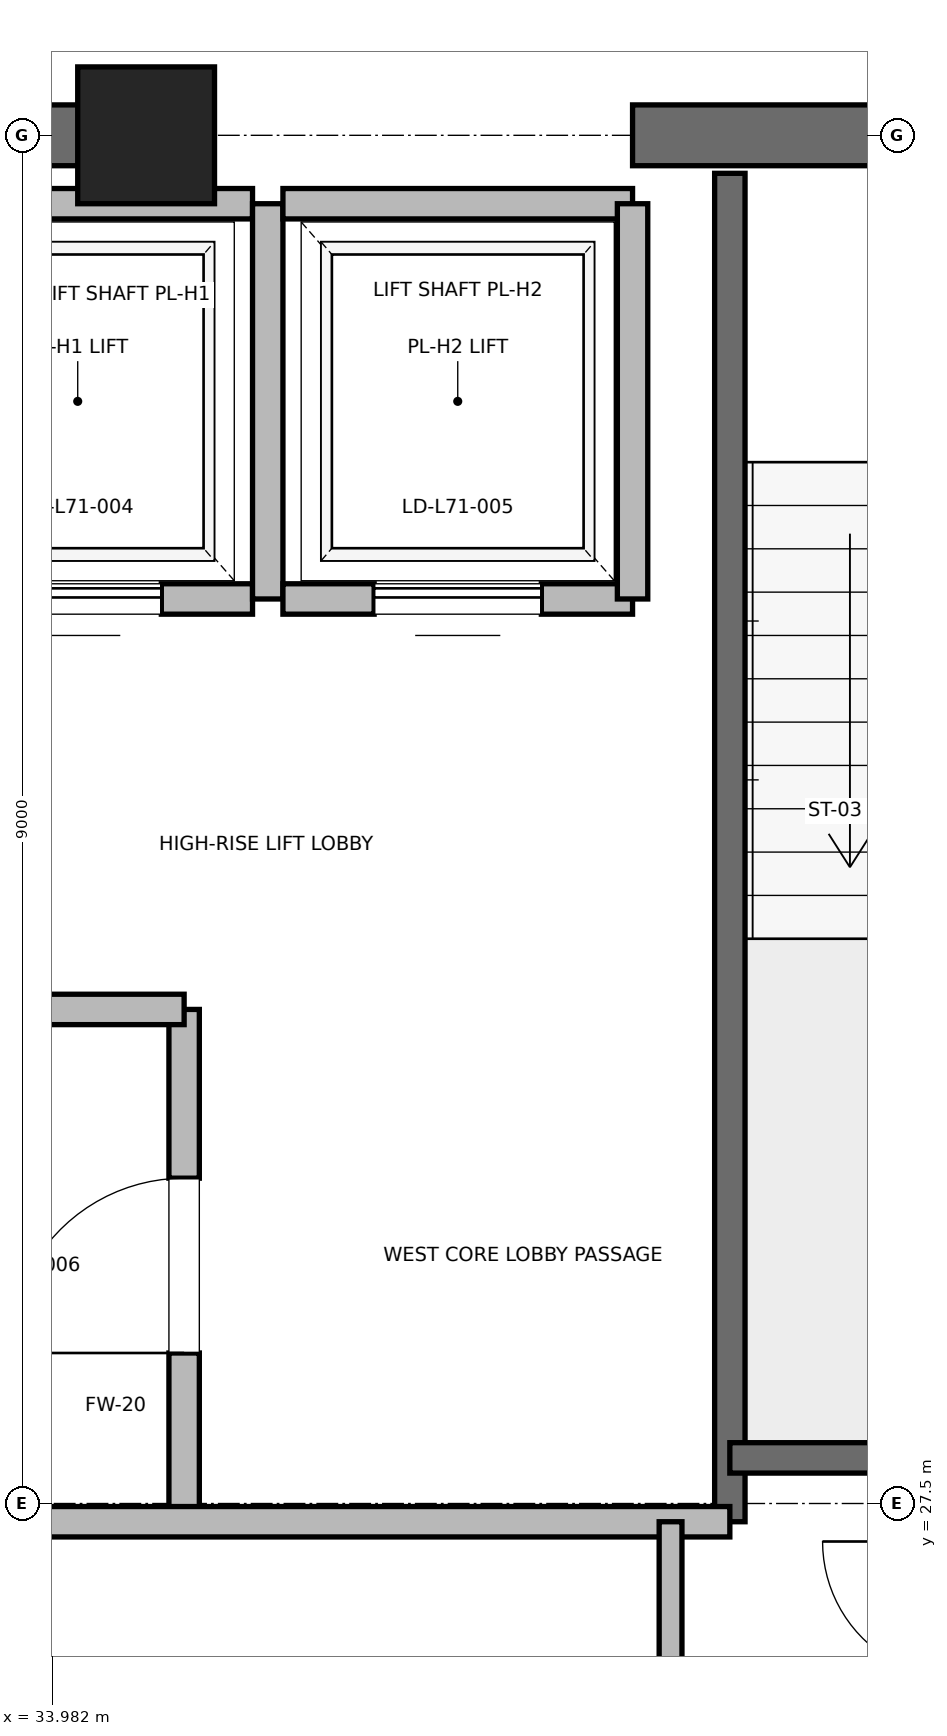
"""IFC4 building model, lengths in metres.
Left out: names, types, materials, properties, quantities, classifications, styles, units other than length and angle.
Written with IfcOpenShell. Run it as: python <this file> out.ifc"""

import sys

from ifc_helpers import new_model, si_unit, direction, frame, frame_2d, origin, origin_2d, place, context, subcontext, project, spatial, rectangle, extrude, element, fill, save


model = new_model("IFC4")
c1 = context("Model", 3, precision=1e-05, world=origin(), true_north=direction((0.0, 1.0)))
c2 = subcontext(c1, "Body", "Model", "MODEL_VIEW")
j1 = project(units=[si_unit("LENGTHUNIT", "METRE"), si_unit("PLANEANGLEUNIT", "RADIAN")], contexts=[c1])
p1 = place(None, origin())
s1 = spatial("IfcSite", under=j1, at=p1, CompositionType="ELEMENT")
p2 = place(p1, origin())
s2 = spatial("IfcBuilding", under=s1, at=p2, CompositionType="ELEMENT")
p3 = place(p2, frame((0.0, 0.0, 306.8)))
s3 = spatial("IfcBuildingStorey", under=s2, at=p3, CompositionType="ELEMENT", Elevation=306.8)
p4 = place(p3, frame((34.6, 36.5, 0.0), z_axis=(0.0, 0.0, 1.0), x_axis=(1.0, 0.0, 0.0)))
e1 = element("IfcColumn", 1, at=p4, inside=s3, PredefinedType="PILASTER", context=c2, shape_type="SweptSolid", body=[
    extrude(rectangle(XDim=0.9, YDim=0.9, at=origin_2d()), origin(), (0.0, 0.0, 1.0), 4.0),
])
p5 = place(p3, frame((29.0, 36.5, 0.0), z_axis=(0.0, 0.0, 1.0), x_axis=(1.0, 0.0, 0.0)))
e2 = element("IfcWall", 2, at=p5, inside=s3, PredefinedType="SHEAR", context=c2, shape_type="SweptSolid", body=[
    extrude(rectangle(XDim=5.8, YDim=0.4, at=frame_2d((2.9, 0.0))), origin(), (0.0, 0.0, 1.0), 3.785),
])
p6 = place(p3, frame((37.8, 36.5, 0.0), z_axis=(0.0, 0.0, 1.0), x_axis=(1.0, 0.0, 0.0)))
e3 = element("IfcWall", 3, at=p6, inside=s3, PredefinedType="SHEAR", context=c2, shape_type="SweptSolid", body=[
    extrude(rectangle(XDim=4.4, YDim=0.4, at=frame_2d((2.2, 0.0))), origin(), (0.0, 0.0, 1.0), 3.785),
])
p7 = place(p6, frame((1.65, 0.0, 0.0)))
e4 = element("IfcOpeningElement", 4, at=p7, cuts=e3, PredefinedType="OPENING", context=c2, shape_type="SweptSolid", body=[
    extrude(rectangle(XDim=1.1, YDim=2.15, at=frame_2d((0.55, 1.075))), frame((0.0, 0.2, 0.0), z_axis=(0.0, -1.0, 0.0), x_axis=(1.0, 0.0, 0.0)), (0.0, 0.0, 1.0), 0.4),
])
p8 = place(p3, frame((38.44, 27.38, 0.0), z_axis=(0.0, 0.0, 1.0), x_axis=(0.0, 1.0, 0.0)))
e5 = element("IfcWall", 5, at=p8, inside=s3, PredefinedType="SOLIDWALL", context=c2, shape_type="SweptSolid", body=[
    extrude(rectangle(XDim=8.87, YDim=0.2, at=frame_2d((4.435, 0.0))), origin(), (0.0, 0.0, 1.0), 3.785),
])
p9 = place(p3, frame((38.44, 27.8, 0.0), z_axis=(0.0, 0.0, 1.0), x_axis=(1.0, 0.0, 0.0)))
e6 = element("IfcWall", 6, at=p9, inside=s3, PredefinedType="SOLIDWALL", context=c2, shape_type="SweptSolid", body=[
    extrude(rectangle(XDim=3.32, YDim=0.2, at=frame_2d((1.66, 0.0))), origin(), (0.0, 0.0, 1.0), 3.785),
])
p10 = place(p3, frame((34.85, 27.38, 0.0), z_axis=(0.0, 0.0, 1.0), x_axis=(0.0, 1.0, 0.0)))
e7 = element("IfcWall", 7, at=p10, inside=s3, PredefinedType="PARTITIONING", context=c2, shape_type="SweptSolid", body=[
    extrude(rectangle(XDim=3.37, YDim=0.2, at=frame_2d((1.685, 0.0))), origin(), (0.0, 0.0, 1.0), 3.785),
])
p11 = place(p10, frame((1.11, 0.0, 0.0)))
e8 = element("IfcOpeningElement", 8, at=p11, cuts=e7, PredefinedType="OPENING", context=c2, shape_type="SweptSolid", body=[
    extrude(rectangle(XDim=1.15, YDim=2.2, at=frame_2d((0.575, 1.1))), frame((0.0, 0.1, 0.0), z_axis=(0.0, -1.0, 0.0), x_axis=(1.0, 0.0, 0.0)), (0.0, 0.0, 1.0), 0.2),
])
p12 = place(p3, frame((32.82, 27.38, 0.0), z_axis=(0.0, 0.0, 1.0), x_axis=(1.0, 0.0, 0.0)))
e9 = element("IfcWall", 9, at=p12, inside=s3, PredefinedType="PARTITIONING", context=c2, shape_type="SweptSolid", body=[
    extrude(rectangle(XDim=5.62, YDim=0.2, at=frame_2d((2.81, 0.0))), origin(), (0.0, 0.0, 1.0), 3.785),
])
p13 = place(p3, frame((32.15, 30.75, 0.0), z_axis=(0.0, 0.0, 1.0), x_axis=(1.0, 0.0, 0.0)))
e10 = element("IfcWall", 10, at=p13, inside=s3, PredefinedType="PARTITIONING", context=c2, shape_type="SweptSolid", body=[
    extrude(rectangle(XDim=2.7, YDim=0.2, at=frame_2d((1.35, 0.0))), origin(), (0.0, 0.0, 1.0), 3.785),
])
p14 = place(p3, frame((33.0, 33.45, 0.0), z_axis=(0.0, 0.0, 1.0), x_axis=(1.0, 0.0, 0.0)))
e11 = element("IfcWall", 11, at=p14, inside=s3, PredefinedType="SOLIDWALL", context=c2, shape_type="SweptSolid", body=[
    extrude(rectangle(XDim=2.3, YDim=0.2, at=frame_2d((1.15, 0.0))), origin(), (0.0, 0.0, 1.0), 3.785),
])
p15 = place(p14, frame((0.6, 0.0, 0.0)))
e12 = element("IfcOpeningElement", 12, at=p15, cuts=e11, PredefinedType="OPENING", context=c2, shape_type="SweptSolid", body=[
    extrude(rectangle(XDim=1.1, YDim=2.2, at=frame_2d((0.55, 1.1))), frame((0.0, 0.1, 0.0), z_axis=(0.0, -1.0, 0.0), x_axis=(1.0, 0.0, 0.0)), (0.0, 0.0, 1.0), 0.2),
])
p16 = place(p3, frame((35.3, 36.05, 0.0), z_axis=(0.0, 0.0, 1.0), x_axis=(-1.0, 0.0, 0.0)))
e13 = element("IfcWall", 13, at=p16, inside=s3, PredefinedType="SOLIDWALL", context=c2, shape_type="SweptSolid", body=[
    extrude(rectangle(XDim=2.3, YDim=0.2, at=frame_2d((1.15, 0.0))), origin(), (0.0, 0.0, 1.0), 2.865),
])
p17 = place(p3, frame((35.4, 33.45, 0.0), z_axis=(0.0, 0.0, 1.0), x_axis=(0.0, 1.0, 0.0)))
e14 = element("IfcWall", 14, at=p17, inside=s3, PredefinedType="SOLIDWALL", context=c2, shape_type="SweptSolid", body=[
    extrude(rectangle(XDim=2.6, YDim=0.2, at=frame_2d((1.3, 0.0))), origin(), (0.0, 0.0, 1.0), 2.865),
])
p18 = place(p3, frame((35.5, 33.45, 0.0), z_axis=(0.0, 0.0, 1.0), x_axis=(1.0, 0.0, 0.0)))
e15 = element("IfcWall", 15, at=p18, inside=s3, PredefinedType="SOLIDWALL", context=c2, shape_type="SweptSolid", body=[
    extrude(rectangle(XDim=2.3, YDim=0.2, at=frame_2d((1.15, 0.0))), origin(), (0.0, 0.0, 1.0), 3.785),
])
p19 = place(p18, frame((0.6, 0.0, 0.0)))
e16 = element("IfcOpeningElement", 16, at=p19, cuts=e15, PredefinedType="OPENING", context=c2, shape_type="SweptSolid", body=[
    extrude(rectangle(XDim=1.1, YDim=2.2, at=frame_2d((0.55, 1.1))), frame((0.0, 0.1, 0.0), z_axis=(0.0, -1.0, 0.0), x_axis=(1.0, 0.0, 0.0)), (0.0, 0.0, 1.0), 0.2),
])
p20 = place(p3, frame((37.8, 36.05, 0.0), z_axis=(0.0, 0.0, 1.0), x_axis=(-1.0, 0.0, 0.0)))
e17 = element("IfcWall", 17, at=p20, inside=s3, PredefinedType="SOLIDWALL", context=c2, shape_type="SweptSolid", body=[
    extrude(rectangle(XDim=2.3, YDim=0.2, at=frame_2d((1.15, 0.0))), origin(), (0.0, 0.0, 1.0), 2.865),
])
p21 = place(p3, frame((37.8, 33.45, 0.0), z_axis=(0.0, 0.0, 1.0), x_axis=(0.0, 1.0, 0.0)))
e18 = element("IfcWall", 18, at=p21, inside=s3, PredefinedType="SOLIDWALL", context=c2, shape_type="SweptSolid", body=[
    extrude(rectangle(XDim=2.6, YDim=0.2, at=frame_2d((1.3, 0.0))), origin(), (0.0, 0.0, 1.0), 2.865),
])
p22 = place(p3, frame((38.05, 24.5, 0.0), z_axis=(0.0, 0.0, 1.0), x_axis=(0.0, 1.0, 0.0)))
e19 = element("IfcWall", 19, at=p22, inside=s3, PredefinedType="PARTITIONING", context=c2, shape_type="SweptSolid", body=[
    extrude(rectangle(XDim=2.88, YDim=0.15, at=frame_2d((1.44, 0.0))), origin(), (0.0, 0.0, 1.0), 2.85),
])
p23 = place(p22, frame((0.94, 0.0, 0.0)))
e20 = element("IfcOpeningElement", 20, at=p23, cuts=e19, PredefinedType="OPENING", context=c2, shape_type="SweptSolid", body=[
    extrude(rectangle(XDim=1.0, YDim=2.15, at=frame_2d((0.5, 1.075))), frame((0.0, 0.075, 0.0), z_axis=(0.0, -1.0, 0.0), x_axis=(1.0, 0.0, 0.0)), (0.0, 0.0, 1.0), 0.15),
])
p24 = place(p11, origin())
e21 = element("IfcDoor", 21, at=p24, inside=s3, OperationType="SINGLE_SWING_LEFT", PredefinedType="DOOR", context=c2, shape_type="SweptSolid", body=[
    extrude(rectangle(XDim=1.15, YDim=2.2, at=frame_2d((0.575, 1.1))), frame((0.0, 0.025, 0.0), z_axis=(0.0, -1.0, 0.0), x_axis=(1.0, 0.0, 0.0)), (0.0, 0.0, 1.0), 0.05),
])
fill(e8, e21)
p25 = place(p15, origin())
e22 = element("IfcDoor", 22, at=p25, inside=s3, OperationType="SLIDING_TO_RIGHT", PredefinedType="DOOR", context=c2, shape_type="SweptSolid", body=[
    extrude(rectangle(XDim=1.1, YDim=2.2, at=frame_2d((0.55, 1.1))), frame((0.0, 0.025, 0.0), z_axis=(0.0, -1.0, 0.0), x_axis=(1.0, 0.0, 0.0)), (0.0, 0.0, 1.0), 0.05),
])
fill(e12, e22)
p26 = place(p19, origin())
e23 = element("IfcDoor", 23, at=p26, inside=s3, OperationType="SLIDING_TO_RIGHT", PredefinedType="DOOR", context=c2, shape_type="SweptSolid", body=[
    extrude(rectangle(XDim=1.1, YDim=2.2, at=frame_2d((0.55, 1.1))), frame((0.0, 0.025, 0.0), z_axis=(0.0, -1.0, 0.0), x_axis=(1.0, 0.0, 0.0)), (0.0, 0.0, 1.0), 0.05),
])
fill(e16, e23)
save(model, sys.argv[1])
